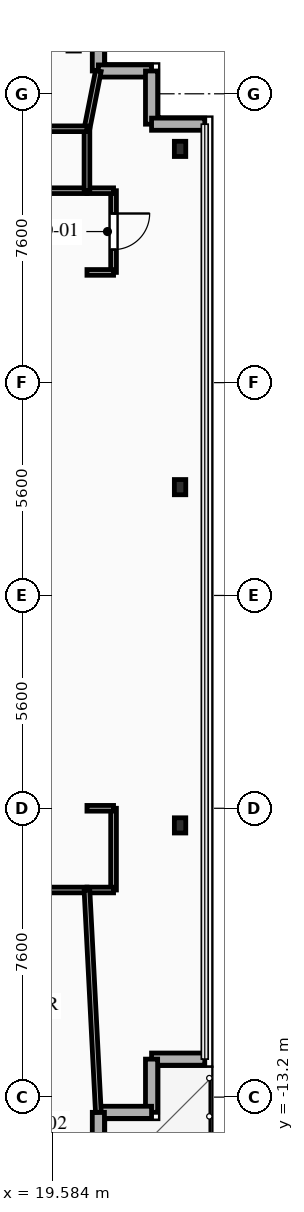
"""IFC4 building model, lengths in metres.
Left out: names, types, materials, properties, quantities, classifications, styles, units other than length and angle.
Written with IfcOpenShell. Run it as: python <this file> out.ifc"""

import sys

from ifc_helpers import new_model, si_unit, direction, frame, frame_2d, origin, origin_2d, place, context, subcontext, project, spatial, rectangle, i_section, extrude, element, fill, save


model = new_model("IFC4")
c1 = context("Model", 3, precision=1e-05, world=origin(), true_north=direction((0.0, 1.0)))
c2 = subcontext(c1, "Body", "Model", "MODEL_VIEW")
j1 = project(units=[si_unit("LENGTHUNIT", "METRE"), si_unit("PLANEANGLEUNIT", "RADIAN")], contexts=[c1])
p1 = place(None, origin())
s1 = spatial("IfcSite", under=j1, at=p1, CompositionType="ELEMENT")
p2 = place(p1, origin())
s2 = spatial("IfcBuilding", under=s1, at=p2, CompositionType="ELEMENT")
p3 = place(p2, frame((0.0, 0.0, 261.8)))
s3 = spatial("IfcBuildingStorey", under=s2, at=p3, CompositionType="ELEMENT", Elevation=261.8)
for number, where, z_axis, x_axis in (
    (1, (22.95, -6.05, 0.0), (0.0, 0.0, 1.0), (1.0, 0.0, 0.0)),
    (2, (22.95, 2.85, 0.0), (0.0, 0.0, 1.0), (1.0, 0.0, 0.0)),
    (3, (22.95, 11.75, 0.0), (0.0, 0.0, 1.0), (1.0, 0.0, 0.0)),
):
    element("IfcColumn", number, at=place(p3, frame(where, z_axis=z_axis, x_axis=x_axis)), inside=s3, PredefinedType="COLUMN", context=c2, shape_type="SweptSolid", body=[
        extrude(i_section(OverallWidth=0.3, OverallDepth=0.4, WebThickness=0.013, FlangeThickness=0.024, FilletRadius=0.027, at=origin_2d()), origin(), (0.0, 0.0, 1.0), 4.2),
    ])
for number, where, z_axis, x_axis in (
    (4, (20.8, 15.2, 0.0), (0.0, 0.0, 1.0), (0.0, -1.0, 0.0)),
    (5, (20.8, 13.8, 0.0), (0.0, 0.0, 1.0), (1.0, 0.0, 0.0)),
):
    element("IfcWall", number, at=place(p3, frame(where, z_axis=z_axis, x_axis=x_axis)), inside=s3, PredefinedType="SOLIDWALL", context=c2, shape_type="SweptSolid", body=[
        extrude(rectangle(XDim=1.4, YDim=0.32, at=frame_2d((0.7, 0.0))), origin(), (0.0, 0.0, 1.0), 3.78),
    ])
for number, where, z_axis, x_axis in (
    (6, (22.2, 13.8, 0.0), (0.0, 0.0, 1.0), (0.0, -1.0, 0.0)),
    (7, (22.2, 12.4, 0.0), (0.0, 0.0, 1.0), (1.0, 0.0, 0.0)),
    (8, (23.6, -12.2, 0.0), (0.0, 0.0, 1.0), (-1.0, 0.0, 0.0)),
    (9, (22.2, -12.2, 0.0), (0.0, 0.0, 1.0), (0.0, -1.0, 0.0)),
):
    element("IfcWall", number, at=place(p3, frame(where, z_axis=z_axis, x_axis=x_axis)), inside=s3, PredefinedType="SOLIDWALL", context=c2, shape_type="SweptSolid", body=[
        extrude(rectangle(XDim=1.4, YDim=0.32, at=frame_2d((0.7, 0.0))), origin(), (0.0, 0.0, 1.0), 3.78),
    ])
for number, where, z_axis, x_axis in (
    (10, (22.2, -13.6, 0.0), (0.0, 0.0, 1.0), (-1.0, 0.0, 0.0)),
    (11, (20.8, -13.6, 0.0), (0.0, 0.0, 1.0), (0.0, -1.0, 0.0)),
):
    element("IfcWall", number, at=place(p3, frame(where, z_axis=z_axis, x_axis=x_axis)), inside=s3, PredefinedType="SOLIDWALL", context=c2, shape_type="SweptSolid", body=[
        extrude(rectangle(XDim=1.4, YDim=0.32, at=frame_2d((0.7, 0.0))), origin(), (0.0, 0.0, 1.0), 3.78),
    ])
p4 = place(p3, frame((21.2, 10.65, 0.0), z_axis=(0.0, 0.0, 1.0), x_axis=(0.0, -1.0, 0.0)))
e12 = element("IfcWall", 12, at=p4, inside=s3, PredefinedType="PARTITIONING", context=c2, shape_type="SweptSolid", body=[
    extrude(rectangle(XDim=2.15, YDim=0.15, at=frame_2d((1.075, 0.0))), origin(), (0.0, 0.0, 1.0), 3.78),
])
p5 = place(p4, frame((0.6, 0.0, 0.0)))
e13 = element("IfcOpeningElement", 13, at=p5, cuts=e12, PredefinedType="OPENING", context=c2, shape_type="SweptSolid", body=[
    extrude(rectangle(XDim=0.95, YDim=2.1, at=frame_2d((0.475, 1.05))), frame((0.0, 0.085, 0.0), z_axis=(0.0, -1.0, 0.0), x_axis=(1.0, 0.0, 0.0)), (0.0, 0.0, 1.0), 0.17),
])
for number, where, z_axis, x_axis in (
    (14, (20.5, 10.65, 0.0), (0.0, 0.0, 1.0), (1.0, 0.0, 0.0)),
    (15, (21.2, 8.5, 0.0), (0.0, 0.0, 1.0), (-1.0, 0.0, 0.0)),
):
    element("IfcWall", number, at=place(p3, frame(where, z_axis=z_axis, x_axis=x_axis)), inside=s3, PredefinedType="PARTITIONING", context=c2, shape_type="SweptSolid", body=[
        extrude(rectangle(XDim=0.7, YDim=0.15, at=frame_2d((0.35, 0.0))), origin(), (0.0, 0.0, 1.0), 3.78),
    ])
p6 = place(p3, frame((11.6, 10.65, 0.0), z_axis=(0.0, 0.0, 1.0), x_axis=(1.0, 0.0, 0.0)))
e16 = element("IfcWall", 16, at=p6, inside=s3, PredefinedType="PLUMBINGWALL", context=c2, shape_type="SweptSolid", body=[
    extrude(rectangle(XDim=8.9, YDim=0.15, at=frame_2d((4.45, 0.0))), origin(), (0.0, 0.0, 1.0), 3.78),
])
p7 = place(p6, frame((4.855, 0.0, 0.0)))
e17 = element("IfcOpeningElement", 17, at=p7, cuts=e16, PredefinedType="OPENING", context=c2, shape_type="SweptSolid", body=[
    extrude(rectangle(XDim=0.9, YDim=2.1, at=frame_2d((0.45, 1.05))), frame((0.0, 0.085, 0.0), z_axis=(0.0, -1.0, 0.0), x_axis=(1.0, 0.0, 0.0)), (0.0, 0.0, 1.0), 0.17),
])
p8 = place(p3, frame((20.5, -7.75, 0.0), z_axis=(0.0, 0.0, 1.0), x_axis=(-1.0, 0.0, 0.0)))
e18 = element("IfcWall", 18, at=p8, inside=s3, PredefinedType="PARTITIONING", context=c2, shape_type="SweptSolid", body=[
    extrude(rectangle(XDim=9.5, YDim=0.15, at=frame_2d((4.75, 0.0))), origin(), (0.0, 0.0, 1.0), 3.78),
])
p9 = place(p8, frame((6.123, 0.0, 0.0)))
e19 = element("IfcOpeningElement", 19, at=p9, cuts=e18, PredefinedType="OPENING", context=c2, shape_type="SweptSolid", body=[
    extrude(rectangle(XDim=0.95, YDim=2.1, at=frame_2d((0.475, 1.05))), frame((0.0, 0.085, 0.0), z_axis=(0.0, -1.0, 0.0), x_axis=(1.0, 0.0, 0.0)), (0.0, 0.0, 1.0), 0.17),
])
p10 = place(p3, frame((21.2, -5.6, 0.0), z_axis=(0.0, 0.0, 1.0), x_axis=(0.0, -1.0, 0.0)))
e20 = element("IfcWall", 20, at=p10, inside=s3, PredefinedType="PARTITIONING", context=c2, shape_type="SweptSolid", body=[
    extrude(rectangle(XDim=2.15, YDim=0.15, at=frame_2d((1.075, 0.0))), origin(), (0.0, 0.0, 1.0), 3.78),
])
for number, where, z_axis, x_axis in (
    (21, (20.5, -5.6, 0.0), (0.0, 0.0, 1.0), (1.0, 0.0, 0.0)),
    (22, (21.2, -7.75, 0.0), (0.0, 0.0, 1.0), (-1.0, 0.0, 0.0)),
):
    element("IfcWall", number, at=place(p3, frame(where, z_axis=z_axis, x_axis=x_axis)), inside=s3, PredefinedType="PARTITIONING", context=c2, shape_type="SweptSolid", body=[
        extrude(rectangle(XDim=0.7, YDim=0.15, at=frame_2d((0.35, 0.0))), origin(), (0.0, 0.0, 1.0), 3.78),
    ])
p11 = place(p3, frame((20.5, -7.75, 0.0), z_axis=(0.0, 0.0, 1.0), x_axis=(0.05122221301, -0.998687280831, 0.0)))
e23 = element("IfcWall", 23, at=p11, inside=s3, PredefinedType="PARTITIONING", context=c2, shape_type="SweptSolid", body=[
    extrude(rectangle(XDim=5.858, YDim=0.15, at=frame_2d((2.929, 0.0))), origin(), (0.0, 0.0, 1.0), 3.78),
])
p12 = place(p3, frame((20.5, 10.65, 0.0), z_axis=(0.0, 0.0, 1.0), x_axis=(0.0, 1.0, 0.0)))
e24 = element("IfcWall", 24, at=p12, inside=s3, PredefinedType="PLUMBINGWALL", context=c2, shape_type="SweptSolid", body=[
    extrude(rectangle(XDim=1.63, YDim=0.15, at=frame_2d((0.815, 0.0))), origin(), (0.0, 0.0, 1.0), 3.78),
])
p13 = place(p3, frame((20.5, 12.28, 0.0), z_axis=(0.0, 0.0, 1.0), x_axis=(0.193660970649, 0.981068513636, 0.0)))
e25 = element("IfcWall", 25, at=p13, inside=s3, PredefinedType="PARTITIONING", context=c2, shape_type="SweptSolid", body=[
    extrude(rectangle(XDim=1.549, YDim=0.15, at=frame_2d((0.775, 0.0))), origin(), (0.0, 0.0, 1.0), 3.78),
])
p14 = place(p3, frame((11.6, 12.28, 0.0), z_axis=(0.0, 0.0, 1.0), x_axis=(1.0, 0.0, 0.0)))
e26 = element("IfcWall", 26, at=p14, inside=s3, PredefinedType="PLUMBINGWALL", context=c2, shape_type="SweptSolid", body=[
    extrude(rectangle(XDim=8.9, YDim=0.15, at=frame_2d((4.45, 0.0))), origin(), (0.0, 0.0, 1.0), 3.78),
])
p15 = place(p5, origin())
e27 = element("IfcDoor", 27, at=p15, inside=s3, OperationType="SINGLE_SWING_LEFT", PredefinedType="DOOR", context=c2, shape_type="SweptSolid", body=[
    extrude(rectangle(XDim=0.95, YDim=2.1, at=frame_2d((0.475, 1.05))), frame((0.0, 0.025, 0.0), z_axis=(0.0, -1.0, 0.0), x_axis=(1.0, 0.0, 0.0)), (0.0, 0.0, 1.0), 0.05),
])
fill(e13, e27)
save(model, sys.argv[1])
